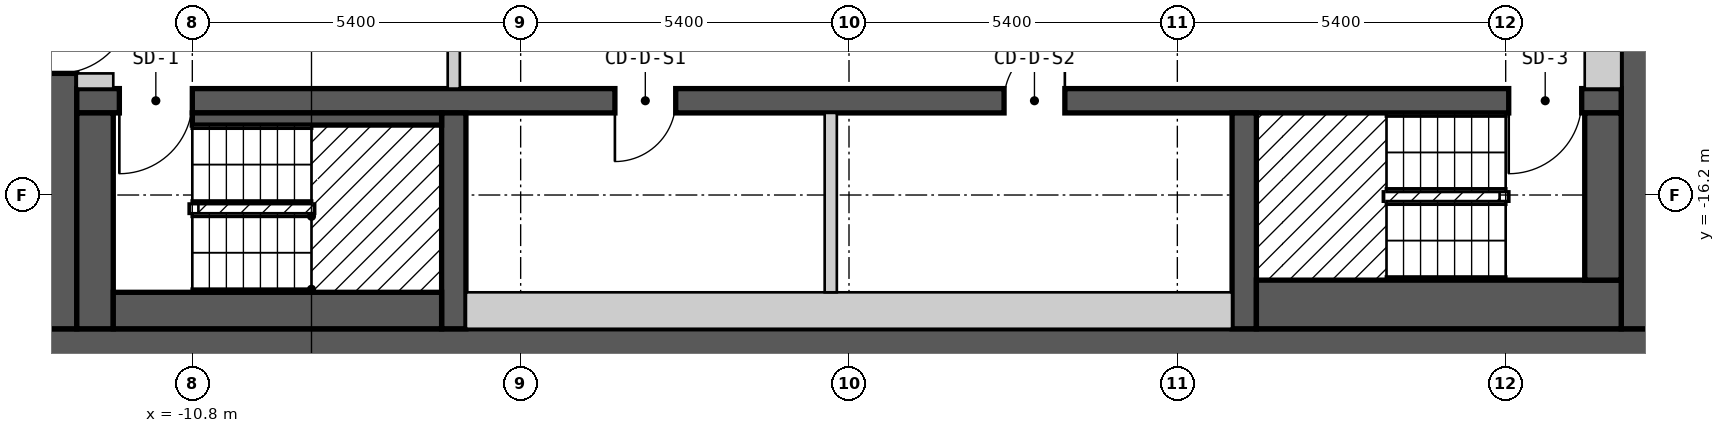
"""IFC4 building model, lengths in metres.
Left out: names, types, materials, properties, quantities, classifications, styles, units other than length and angle.
Written with IfcOpenShell. Run it as: python <this file> out.ifc"""

import sys

from ifc_helpers import new_model, si_unit, direction, frame, frame_2d, origin, place, context, subcontext, project, spatial, rectangle, extrude, element, fill, save


model = new_model("IFC4")
c1 = context("Model", 3, precision=1e-05, world=origin(), true_north=direction((0.0, 1.0)))
c2 = subcontext(c1, "Body", "Model", "MODEL_VIEW")
j1 = project(units=[si_unit("LENGTHUNIT", "METRE"), si_unit("PLANEANGLEUNIT", "RADIAN")], contexts=[c1])
p1 = place(None, origin())
s1 = spatial("IfcSite", under=j1, at=p1, CompositionType="ELEMENT")
p2 = place(p1, origin())
s2 = spatial("IfcBuilding", under=s1, at=p2, CompositionType="ELEMENT")
p3 = place(p2, frame((0.0, 0.0, 184.2)))
s3 = spatial("IfcBuildingStorey", under=s2, at=p3, CompositionType="ELEMENT", Elevation=184.2)
p4 = place(p3, frame((-13.3, -18.7, 0.0), z_axis=(0.0, 0.0, 1.0), x_axis=(1.0, 0.0, 0.0)))
e1 = element("IfcWall", 1, at=p4, inside=s3, PredefinedType="SHEAR", context=c2, shape_type="SweptSolid", body=[
    extrude(rectangle(XDim=26.6, YDim=0.6, at=frame_2d((13.3, 0.0))), origin(), (0.0, 0.0, 1.0), 2.7),
])
p5 = place(p3, frame((-13.0, -18.4, 0.0), z_axis=(0.0, 0.0, 1.0), x_axis=(0.0, 1.0, 0.0)))
e2 = element("IfcWall", 2, at=p5, inside=s3, PredefinedType="SHEAR", context=c2, shape_type="SweptSolid", body=[
    extrude(rectangle(XDim=12.8, YDim=0.6, at=frame_2d((6.4, 0.0))), origin(), (0.0, 0.0, 1.0), 2.7),
])
p6 = place(p5, frame((4.2, 0.0, 0.0)))
e3 = element("IfcOpeningElement", 3, at=p6, cuts=e2, PredefinedType="OPENING", context=c2, shape_type="SweptSolid", body=[
    extrude(rectangle(XDim=1.2, YDim=2.1, at=frame_2d((0.6, 1.05))), frame((0.0, 0.31, 0.0), z_axis=(0.0, -1.0, 0.0), x_axis=(1.0, 0.0, 0.0)), (0.0, 0.0, 1.0), 0.62),
])
p7 = place(p3, frame((13.0, -18.4, 0.0), z_axis=(0.0, 0.0, 1.0), x_axis=(0.0, 1.0, 0.0)))
e4 = element("IfcWall", 4, at=p7, inside=s3, PredefinedType="SHEAR", context=c2, shape_type="SweptSolid", body=[
    extrude(rectangle(XDim=12.8, YDim=0.6, at=frame_2d((6.4, 0.0))), origin(), (0.0, 0.0, 1.0), 2.7),
])
p8 = place(p3, frame((-12.7, -14.65, 0.0), z_axis=(0.0, 0.0, 1.0), x_axis=(1.0, 0.0, 0.0)))
e5 = element("IfcWall", 5, at=p8, inside=s3, PredefinedType="SHEAR", context=c2, shape_type="SweptSolid", body=[
    extrude(rectangle(XDim=25.4, YDim=0.4, at=frame_2d((12.7, 0.0))), origin(), (0.0, 0.0, 1.0), 2.7),
])
p9 = place(p8, frame((1.9, 0.0, 0.0), z_axis=(0.0, 0.0, 1.0), x_axis=(-1.0, 0.0, 0.0)))
e6 = element("IfcOpeningElement", 6, at=p9, cuts=e5, PredefinedType="OPENING", context=c2, shape_type="SweptSolid", body=[
    extrude(rectangle(XDim=1.2, YDim=2.1, at=frame_2d((0.6, 1.05))), frame((0.0, 0.21, 0.0), z_axis=(0.0, -1.0, 0.0), x_axis=(1.0, 0.0, 0.0)), (0.0, 0.0, 1.0), 0.42),
])
p10 = place(p8, frame((24.75, 0.0, 0.0), z_axis=(0.0, 0.0, 1.0), x_axis=(-1.0, 0.0, 0.0)))
e7 = element("IfcOpeningElement", 7, at=p10, cuts=e5, PredefinedType="OPENING", context=c2, shape_type="SweptSolid", body=[
    extrude(rectangle(XDim=1.2, YDim=2.1, at=frame_2d((0.6, 1.05))), frame((0.0, 0.21, 0.0), z_axis=(0.0, -1.0, 0.0), x_axis=(1.0, 0.0, 0.0)), (0.0, 0.0, 1.0), 0.42),
])
p11 = place(p8, frame((9.85, 0.0, 0.0), z_axis=(0.0, 0.0, 1.0), x_axis=(-1.0, 0.0, 0.0)))
e8 = element("IfcOpeningElement", 8, at=p11, cuts=e5, PredefinedType="OPENING", context=c2, shape_type="SweptSolid", body=[
    extrude(rectangle(XDim=1.0, YDim=2.1, at=frame_2d((0.5, 1.05))), frame((0.0, 0.21, 0.0), z_axis=(0.0, -1.0, 0.0), x_axis=(1.0, 0.0, 0.0)), (0.0, 0.0, 1.0), 0.42),
])
p12 = place(p8, frame((16.25, 0.0, 0.0), z_axis=(0.0, 0.0, 1.0), x_axis=(-1.0, 0.0, 0.0)))
e9 = element("IfcOpeningElement", 9, at=p12, cuts=e5, PredefinedType="OPENING", context=c2, shape_type="SweptSolid", body=[
    extrude(rectangle(XDim=1.0, YDim=2.1, at=frame_2d((0.5, 1.05))), frame((0.0, 0.21, 0.0), z_axis=(0.0, -1.0, 0.0), x_axis=(1.0, 0.0, 0.0)), (0.0, 0.0, 1.0), 0.42),
])
for number, where, z_axis, x_axis in (
    (10, (-6.5, -18.4, 0.0), (0.0, 0.0, 1.0), (0.0, 1.0, 0.0)),
    (11, (6.5, -18.4, 0.0), (0.0, 0.0, 1.0), (0.0, 1.0, 0.0)),
):
    element("IfcWall", number, at=place(p3, frame(where, z_axis=z_axis, x_axis=x_axis)), inside=s3, PredefinedType="SHEAR", context=c2, shape_type="SweptSolid", body=[
        extrude(rectangle(XDim=3.55, YDim=0.4, at=frame_2d((1.775, 0.0))), origin(), (0.0, 0.0, 1.0), 2.7),
    ])
p13 = place(p3, frame((-12.4, -18.4, 0.0), z_axis=(0.0, 0.0, 1.0), x_axis=(0.0, 1.0, 0.0)))
e12 = element("IfcWall", 12, at=p13, inside=s3, PredefinedType="SOLIDWALL", context=c2, shape_type="SweptSolid", body=[
    extrude(rectangle(XDim=3.55, YDim=0.6, at=frame_2d((1.775, 0.0))), origin(), (0.0, 0.0, 1.0), 2.7),
])
p14 = place(p3, frame((-12.7, -14.325, 0.0), z_axis=(0.0, 0.0, 1.0), x_axis=(1.0, 0.0, 0.0)))
e13 = element("IfcWall", 13, at=p14, inside=s3, PredefinedType="PARTITIONING", context=c2, shape_type="SweptSolid", body=[
    extrude(rectangle(XDim=0.6, YDim=0.25, at=frame_2d((0.3, 0.0))), origin(), (0.0, 0.0, 1.0), 2.7),
])
p15 = place(p3, frame((-12.1, -18.1, 0.0), z_axis=(0.0, 0.0, 1.0), x_axis=(1.0, 0.0, 0.0)))
e14 = element("IfcWall", 14, at=p15, inside=s3, PredefinedType="SOLIDWALL", context=c2, shape_type="SweptSolid", body=[
    extrude(rectangle(XDim=5.4, YDim=0.6, at=frame_2d((2.7, 0.0))), origin(), (0.0, 0.0, 1.0), 2.7),
])
p16 = place(p3, frame((-10.8, -14.95, 0.0), z_axis=(0.0, 0.0, 1.0), x_axis=(1.0, 0.0, 0.0)))
e15 = element("IfcWall", 15, at=p16, inside=s3, PredefinedType="SOLIDWALL", context=c2, shape_type="SweptSolid", body=[
    extrude(rectangle(XDim=4.1, YDim=0.2, at=frame_2d((2.05, 0.0))), origin(), (0.0, 0.0, 1.0), 2.7),
])
p17 = place(p3, frame((-6.5, -14.45, 0.0), z_axis=(0.0, 0.0, 1.0), x_axis=(0.0, 1.0, 0.0)))
e16 = element("IfcWall", 16, at=p17, inside=s3, PredefinedType="PARTITIONING", context=c2, shape_type="SweptSolid", body=[
    extrude(rectangle(XDim=4.9, YDim=0.2, at=frame_2d((2.45, 0.0))), origin(), (0.0, 0.0, 1.0), 2.7),
])
p18 = place(p17, frame((3.15, 0.0, 0.0), z_axis=(0.0, 0.0, 1.0), x_axis=(-1.0, 0.0, 0.0)))
e17 = element("IfcOpeningElement", 17, at=p18, cuts=e16, PredefinedType="OPENING", context=c2, shape_type="SweptSolid", body=[
    extrude(rectangle(XDim=1.4, YDim=2.1, at=frame_2d((0.7, 1.05))), frame((0.0, 0.11, 0.0), z_axis=(0.0, -1.0, 0.0), x_axis=(1.0, 0.0, 0.0)), (0.0, 0.0, 1.0), 0.22),
])
p19 = place(p3, frame((-6.3, -18.1, 0.0), z_axis=(0.0, 0.0, 1.0), x_axis=(1.0, 0.0, 0.0)))
e18 = element("IfcWall", 18, at=p19, inside=s3, PredefinedType="PARTITIONING", context=c2, shape_type="SweptSolid", body=[
    extrude(rectangle(XDim=12.6, YDim=0.6, at=frame_2d((6.3, 0.0))), origin(), (0.0, 0.0, 1.0), 2.7),
])
p20 = place(p3, frame((-0.3, -17.8, 0.0), z_axis=(0.0, 0.0, 1.0), x_axis=(0.0, 1.0, 0.0)))
e19 = element("IfcWall", 19, at=p20, inside=s3, PredefinedType="PARTITIONING", context=c2, shape_type="SweptSolid", body=[
    extrude(rectangle(XDim=2.95, YDim=0.2, at=frame_2d((1.475, 0.0))), origin(), (0.0, 0.0, 1.0), 2.7),
])
p21 = place(p3, frame((6.7, -18.0, 0.0), z_axis=(0.0, 0.0, 1.0), x_axis=(1.0, 0.0, 0.0)))
e20 = element("IfcWall", 20, at=p21, inside=s3, PredefinedType="SOLIDWALL", context=c2, shape_type="SweptSolid", body=[
    extrude(rectangle(XDim=6.0, YDim=0.8, at=frame_2d((3.0, 0.0))), origin(), (0.0, 0.0, 1.0), 2.7),
])
p22 = place(p3, frame((12.4, -17.6, 0.0), z_axis=(0.0, 0.0, 1.0), x_axis=(0.0, 1.0, 0.0)))
e21 = element("IfcWall", 21, at=p22, inside=s3, PredefinedType="SOLIDWALL", context=c2, shape_type="SweptSolid", body=[
    extrude(rectangle(XDim=2.75, YDim=0.6, at=frame_2d((1.375, 0.0))), origin(), (0.0, 0.0, 1.0), 2.7),
])
p23 = place(p3, frame((12.4, -14.45, 0.0), z_axis=(0.0, 0.0, 1.0), x_axis=(0.0, 1.0, 0.0)))
e22 = element("IfcWall", 22, at=p23, inside=s3, PredefinedType="PARTITIONING", context=c2, shape_type="SweptSolid", body=[
    extrude(rectangle(XDim=8.25, YDim=0.6, at=frame_2d((4.125, 0.0))), origin(), (0.0, 0.0, 1.0), 2.7),
])
p24 = place(p9, origin())
e23 = element("IfcDoor", 23, at=p24, inside=s3, OperationType="SINGLE_SWING_RIGHT", PredefinedType="DOOR", context=c2, shape_type="SweptSolid", body=[
    extrude(rectangle(XDim=1.2, YDim=2.1, at=frame_2d((0.6, 1.05))), frame((0.0, 0.025, 0.0), z_axis=(0.0, -1.0, 0.0), x_axis=(1.0, 0.0, 0.0)), (0.0, 0.0, 1.0), 0.05),
])
fill(e6, e23)
p25 = place(p10, origin())
e24 = element("IfcDoor", 24, at=p25, inside=s3, OperationType="SINGLE_SWING_RIGHT", PredefinedType="DOOR", context=c2, shape_type="SweptSolid", body=[
    extrude(rectangle(XDim=1.2, YDim=2.1, at=frame_2d((0.6, 1.05))), frame((0.0, 0.025, 0.0), z_axis=(0.0, -1.0, 0.0), x_axis=(1.0, 0.0, 0.0)), (0.0, 0.0, 1.0), 0.05),
])
fill(e7, e24)
p26 = place(p6, origin())
e25 = element("IfcDoor", 25, at=p26, inside=s3, OperationType="SINGLE_SWING_RIGHT", PredefinedType="DOOR", context=c2, shape_type="SweptSolid", body=[
    extrude(rectangle(XDim=1.2, YDim=2.1, at=frame_2d((0.6, 1.05))), frame((0.0, 0.025, 0.0), z_axis=(0.0, -1.0, 0.0), x_axis=(1.0, 0.0, 0.0)), (0.0, 0.0, 1.0), 0.05),
])
fill(e3, e25)
p27 = place(p11, origin())
e26 = element("IfcDoor", 26, at=p27, inside=s3, OperationType="SINGLE_SWING_RIGHT", PredefinedType="DOOR", context=c2, shape_type="SweptSolid", body=[
    extrude(rectangle(XDim=1.0, YDim=2.1, at=frame_2d((0.5, 1.05))), frame((0.0, 0.025, 0.0), z_axis=(0.0, -1.0, 0.0), x_axis=(1.0, 0.0, 0.0)), (0.0, 0.0, 1.0), 0.05),
])
fill(e8, e26)
p28 = place(p12, origin())
e27 = element("IfcDoor", 27, at=p28, inside=s3, OperationType="SINGLE_SWING_LEFT", PredefinedType="DOOR", context=c2, shape_type="SweptSolid", body=[
    extrude(rectangle(XDim=1.0, YDim=2.1, at=frame_2d((0.5, 1.05))), frame((0.0, 0.025, 0.0), z_axis=(0.0, -1.0, 0.0), x_axis=(1.0, 0.0, 0.0)), (0.0, 0.0, 1.0), 0.05),
])
fill(e9, e27)
save(model, sys.argv[1])
